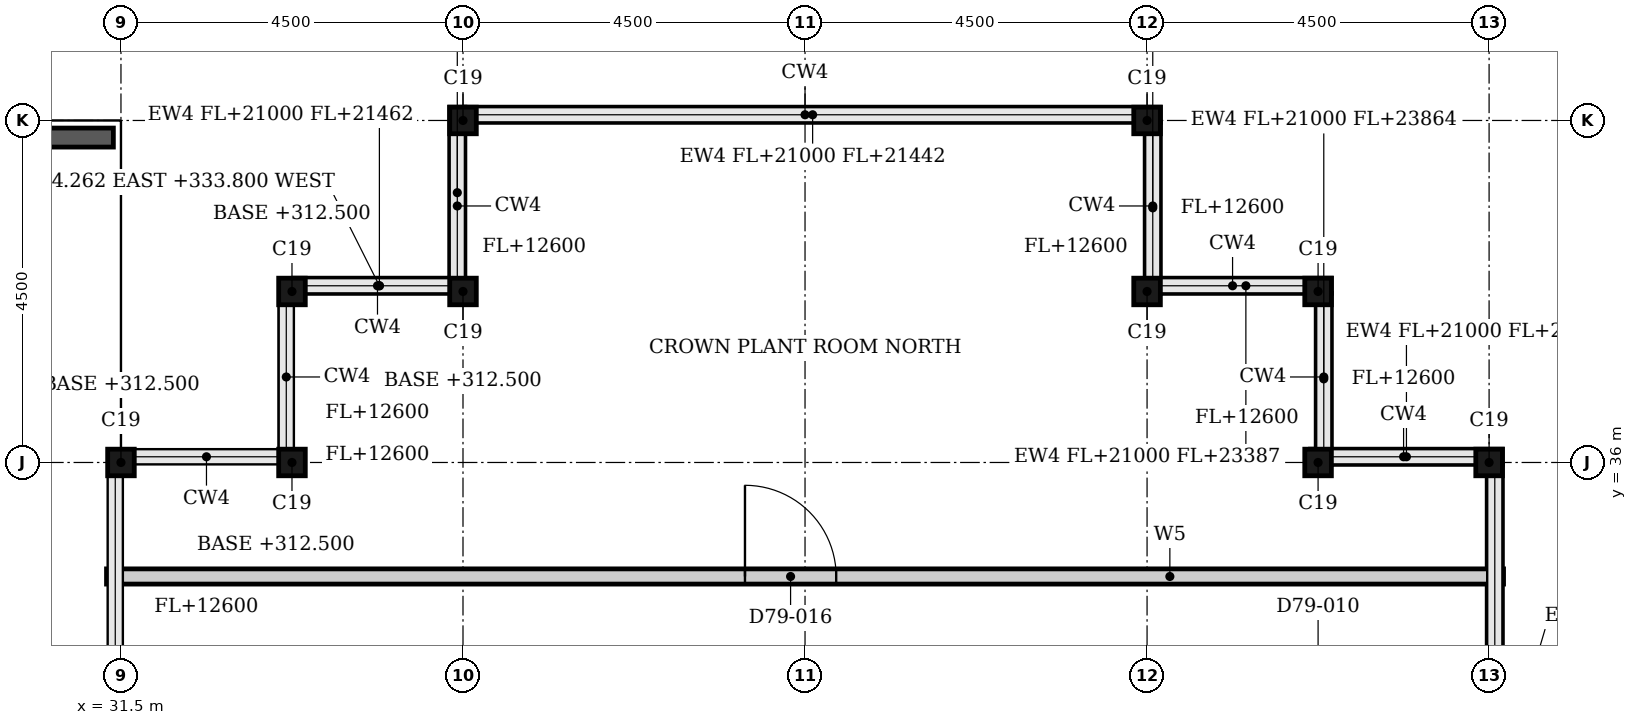
"""IFC4 building model, lengths in metres.
Left out: names, types, materials, properties, quantities, classifications, styles, units other than length and angle.
Written with IfcOpenShell. Run it as: python <this file> out.ifc"""

import sys

from ifc_helpers import new_model, si_unit, direction, frame, frame_2d, origin, origin_2d, place, context, subcontext, project, spatial, polyline, rectangle, i_section, outline, extrude, element, fill, save


model = new_model("IFC4")
c1 = context("Model", 3, precision=1e-05, world=origin(), true_north=direction((0.0, 1.0)))
c2 = subcontext(c1, "Body", "Model", "MODEL_VIEW")
j1 = project(units=[si_unit("LENGTHUNIT", "METRE"), si_unit("PLANEANGLEUNIT", "RADIAN")], contexts=[c1])
p1 = place(None, origin())
s1 = spatial("IfcSite", under=j1, at=p1, CompositionType="ELEMENT")
p2 = place(p1, origin())
s2 = spatial("IfcBuilding", under=s1, at=p2, CompositionType="ELEMENT")
p3 = place(p2, frame((0.0, 0.0, 312.8)))
s3 = spatial("IfcBuildingStorey", under=s2, at=p3, CompositionType="ELEMENT", Elevation=312.8)
for number, where, z_axis, x_axis in (
    (1, (49.5, 36.0, 0.0), (0.0, 0.0, 1.0), (1.0, 0.0, 0.0)),
    (2, (47.25, 36.0, 0.0), (0.0, 0.0, 1.0), (1.0, 0.0, 0.0)),
    (3, (47.25, 38.25, 0.0), (0.0, 0.0, 1.0), (1.0, 0.0, 0.0)),
    (4, (45.0, 38.25, 0.0), (0.0, 0.0, 1.0), (1.0, 0.0, 0.0)),
    (5, (45.0, 40.5, 0.0), (0.0, 0.0, 1.0), (1.0, 0.0, 0.0)),
    (6, (36.0, 40.5, 0.0), (0.0, 0.0, 1.0), (1.0, 0.0, 0.0)),
):
    element("IfcColumn", number, at=place(p3, frame(where, z_axis=z_axis, x_axis=x_axis)), inside=s3, PredefinedType="COLUMN", context=c2, shape_type="SweptSolid", body=[
        extrude(i_section(OverallWidth=0.35, OverallDepth=0.35, WebThickness=0.012, FlangeThickness=0.019, FilletRadius=0.013, at=origin_2d()), origin(), (0.0, 0.0, 1.0), 4.2),
    ])
for number, where, z_axis, x_axis in (
    (7, (36.0, 38.25, -0.3), (0.0, 0.0, 1.0), (1.0, 0.0, 0.0)),
    (8, (33.75, 38.25, -0.3), (0.0, 0.0, 1.0), (1.0, 0.0, 0.0)),
    (9, (33.75, 36.0, -0.3), (0.0, 0.0, 1.0), (1.0, 0.0, 0.0)),
    (10, (31.5, 36.0, -0.3), (0.0, 0.0, 1.0), (1.0, 0.0, 0.0)),
):
    element("IfcColumn", number, at=place(p3, frame(where, z_axis=z_axis, x_axis=x_axis)), inside=s3, PredefinedType="COLUMN", context=c2, shape_type="SweptSolid", body=[
        extrude(i_section(OverallWidth=0.35, OverallDepth=0.35, WebThickness=0.012, FlangeThickness=0.019, FilletRadius=0.013, at=origin_2d()), origin(), (0.0, 0.0, 1.0), 4.5),
    ])
p4 = place(p3, frame((27.1, 40.275, 0.0), z_axis=(0.0, 0.0, 1.0), x_axis=(1.0, 0.0, 0.0)))
e11 = element("IfcWall", 11, at=p4, inside=s3, PredefinedType="PARAPET", context=c2, shape_type="SweptSolid", body=[
    extrude(rectangle(XDim=4.3, YDim=0.25, at=frame_2d((2.15, 0.0))), origin(), (0.0, 0.0, 1.0), 1.1),
])
p5 = place(p3, frame((49.575, 27.175, 21.0), z_axis=(0.0, 0.0, 1.0), x_axis=(0.0, 1.0, 0.0)))
e12 = element("IfcWall", 12, at=p5, inside=s3, PredefinedType="SOLIDWALL", context=c2, shape_type="SweptSolid", body=[
    extrude(rectangle(XDim=8.8, YDim=0.2, at=frame_2d((4.4, 0.0))), origin(), (0.0, 0.0, 1.0), 3.342),
])
p6 = place(p3, frame((49.675, 36.075, 21.0), z_axis=(0.0, 0.0, 1.0), x_axis=(-1.0, 0.0, 0.0)))
e13 = element("IfcWall", 13, at=p6, inside=s3, PredefinedType="SOLIDWALL", context=c2, shape_type="SweptSolid", body=[
    extrude(rectangle(XDim=2.525, YDim=0.2, at=frame_2d((1.263, 0.0))), origin(), (0.0, 0.0, 1.0), 2.806),
])
p7 = place(p3, frame((47.325, 35.975, 21.0), z_axis=(0.0, 0.0, 1.0), x_axis=(0.0, 1.0, 0.0)))
e14 = element("IfcWall", 14, at=p7, inside=s3, PredefinedType="SOLIDWALL", context=c2, shape_type="SweptSolid", body=[
    extrude(rectangle(XDim=2.25, YDim=0.2, at=frame_2d((1.125, 0.0))), origin(), (0.0, 0.0, 1.0), 2.864),
])
p8 = place(p3, frame((47.425, 38.325, 21.0), z_axis=(0.0, 0.0, 1.0), x_axis=(-1.0, 0.0, 0.0)))
e15 = element("IfcWall", 15, at=p8, inside=s3, PredefinedType="SOLIDWALL", context=c2, shape_type="SweptSolid", body=[
    extrude(rectangle(XDim=2.25, YDim=0.2, at=frame_2d((1.125, 0.0))), origin(), (0.0, 0.0, 1.0), 2.387),
])
p9 = place(p3, frame((45.075, 38.225, 21.0), z_axis=(0.0, 0.0, 1.0), x_axis=(0.0, 1.0, 0.0)))
e16 = element("IfcWall", 16, at=p9, inside=s3, PredefinedType="SOLIDWALL", context=c2, shape_type="SweptSolid", body=[
    extrude(rectangle(XDim=2.25, YDim=0.2, at=frame_2d((1.125, 0.0))), origin(), (0.0, 0.0, 1.0), 2.385),
])
p10 = place(p3, frame((45.175, 40.575, 21.0), z_axis=(0.0, 0.0, 1.0), x_axis=(-1.0, 0.0, 0.0)))
e17 = element("IfcWall", 17, at=p10, inside=s3, PredefinedType="SOLIDWALL", context=c2, shape_type="SweptSolid", body=[
    extrude(rectangle(XDim=9.15, YDim=0.2, at=frame_2d((4.575, 0.0))), origin(), (0.0, 0.0, 1.0), 0.442),
])
p11 = place(p3, frame((35.925, 40.675, 21.0), z_axis=(0.0, 0.0, 1.0), x_axis=(0.0, -1.0, 0.0)))
e18 = element("IfcWall", 18, at=p11, inside=s3, PredefinedType="SOLIDWALL", context=c2, shape_type="SweptSolid", body=[
    extrude(rectangle(XDim=2.25, YDim=0.2, at=frame_2d((1.125, 0.0))), origin(), (0.0, 0.0, 1.0), 0.44),
])
p12 = place(p3, frame((36.025, 38.325, 21.0), z_axis=(0.0, 0.0, 1.0), x_axis=(-1.0, 0.0, 0.0)))
e19 = element("IfcWall", 19, at=p12, inside=s3, PredefinedType="SOLIDWALL", context=c2, shape_type="SweptSolid", body=[
    extrude(outline(polyline([(0.0, 0.0), (2.25, 0.0), (0.0, 0.462), (0.0, 0.0)])), frame((0.0, 0.1, 0.0), z_axis=(0.0, -1.0, 0.0), x_axis=(1.0, 0.0, 0.0)), (0.0, 0.0, 1.0), 0.2),
])
p13 = place(p3, frame((31.31, 34.5, 0.0), z_axis=(0.0, 0.0, 1.0), x_axis=(1.0, 0.0, 0.0)))
e20 = element("IfcWall", 20, at=p13, inside=s3, PredefinedType="PARTITIONING", context=c2, shape_type="SweptSolid", body=[
    extrude(rectangle(XDim=18.38, YDim=0.2, at=frame_2d((9.19, 0.0))), origin(), (0.0, 0.0, 1.0), 3.9),
])
p14 = place(p13, frame((8.4, 0.0, 0.0)))
e21 = element("IfcOpeningElement", 21, at=p14, cuts=e20, PredefinedType="OPENING", context=c2, shape_type="SweptSolid", body=[
    extrude(rectangle(XDim=1.2, YDim=2.1, at=frame_2d((0.6, 1.05))), frame((0.0, 0.11, 0.0), z_axis=(0.0, -1.0, 0.0), x_axis=(1.0, 0.0, 0.0)), (0.0, 0.0, 1.0), 0.22),
])
p15 = place(p14, origin())
e22 = element("IfcDoor", 22, at=p15, inside=s3, OperationType="SINGLE_SWING_LEFT", PredefinedType="DOOR", context=c2, shape_type="SweptSolid", body=[
    extrude(rectangle(XDim=1.2, YDim=2.1, at=frame_2d((0.6, 1.05))), frame((0.0, 0.025, 0.0), z_axis=(0.0, -1.0, 0.0), x_axis=(1.0, 0.0, 0.0)), (0.0, 0.0, 1.0), 0.05),
])
fill(e21, e22)
save(model, sys.argv[1])
